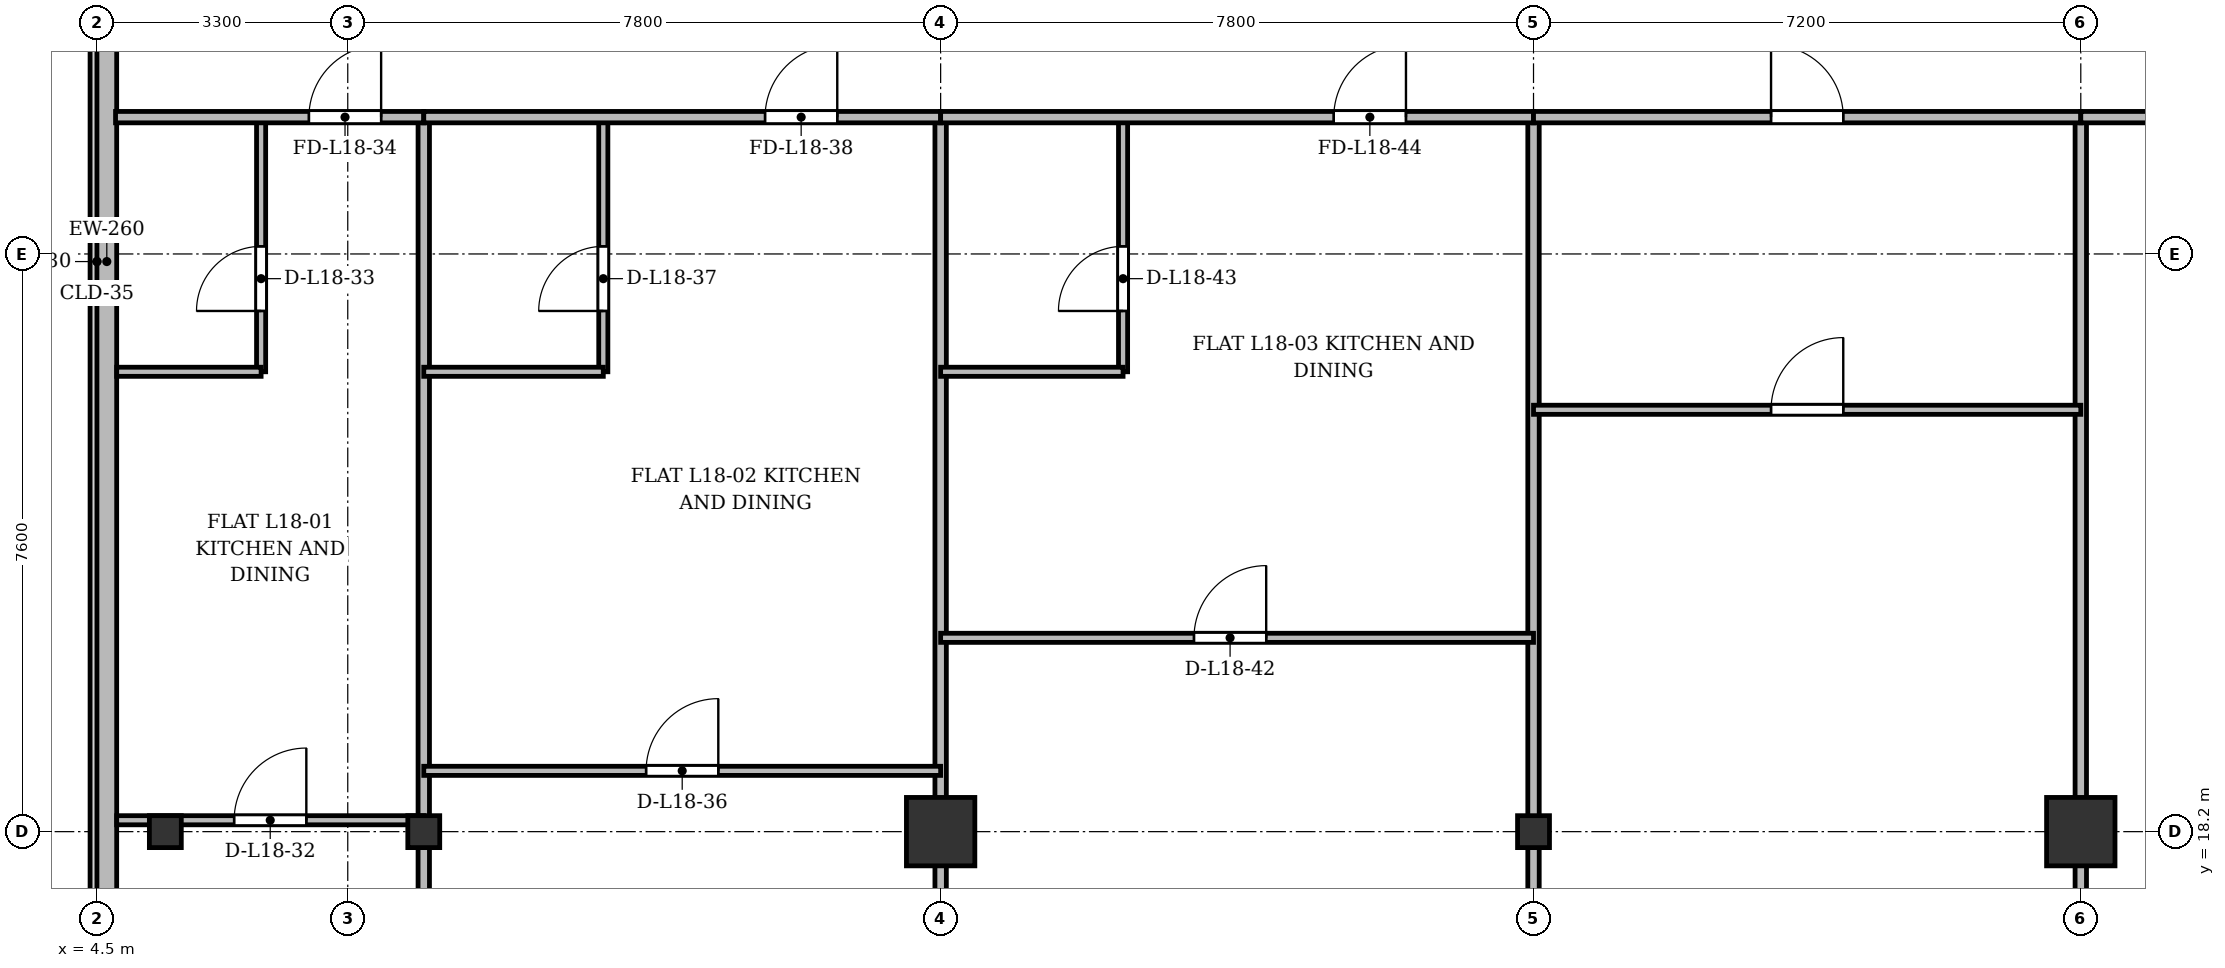
"""IFC4 building model, lengths in metres.
Left out: names, types, materials, properties, quantities, classifications, styles, units other than length and angle.
Written with IfcOpenShell. Run it as: python <this file> out.ifc"""

import sys

from ifc_helpers import new_model, si_unit, direction, frame, frame_2d, origin, origin_2d, place, context, subcontext, project, spatial, rectangle, i_section, extrude, source, transform, mapped, element, fill, save


model = new_model("IFC4")
c1 = context("Model", 3, precision=1e-05, world=origin(), true_north=direction((0.0, 1.0)))
c2 = subcontext(c1, "Body", "Model", "MODEL_VIEW")
j1 = project(units=[si_unit("LENGTHUNIT", "METRE"), si_unit("PLANEANGLEUNIT", "RADIAN")], contexts=[c1])
p1 = place(None, origin())
s1 = spatial("IfcSite", under=j1, at=p1, CompositionType="ELEMENT")
p2 = place(p1, origin())
s2 = spatial("IfcBuilding", under=s1, at=p2, CompositionType="ELEMENT")
p3 = place(p2, frame((0.0, 0.0, 70.3)))
s3 = spatial("IfcBuildingStorey", under=s2, at=p3, CompositionType="ELEMENT", Elevation=70.3)
m1 = source(origin(), c2, "Body", "SweptSolid", [
    extrude(i_section(OverallWidth=0.42, OverallDepth=0.42, WebThickness=0.026, FlangeThickness=0.04, at=origin_2d()), origin(), (0.0, 0.0, 1.0), 3.6),
])
for number, where, z_axis, x_axis in (
    (1, (5.4, 18.2, 0.0), (0.0, 0.0, 1.0), (1.0, 0.0, 0.0)),
    (2, (8.8, 18.2, 0.0), (0.0, 0.0, 1.0), (1.0, 0.0, 0.0)),
):
    element("IfcColumn", number, at=place(p3, frame(where, z_axis=z_axis, x_axis=x_axis)), inside=s3, PredefinedType="COLUMN", context=c2, shape_type="MappedRepresentation", body=[
        mapped(m1, transform((0.0, 0.0, 0.0), x_axis=(1.0, 0.0, 0.0), y_axis=(0.0, 1.0, 0.0), z_axis=(0.0, 0.0, 1.0), scale=1.0)),
    ])
m2 = source(origin(), c2, "Body", "SweptSolid", [
    extrude(rectangle(XDim=0.9, YDim=0.9, at=origin_2d()), origin(), (0.0, 0.0, 1.0), 3.6),
])
p4 = place(p3, frame((15.6, 18.2, 0.0), z_axis=(0.0, 0.0, 1.0), x_axis=(1.0, 0.0, 0.0)))
e3 = element("IfcColumn", 3, at=p4, inside=s3, PredefinedType="COLUMN", context=c2, shape_type="MappedRepresentation", body=[
    mapped(m2, transform((0.0, 0.0, 0.0), x_axis=(1.0, 0.0, 0.0), y_axis=(0.0, 1.0, 0.0), z_axis=(0.0, 0.0, 1.0), scale=1.0)),
])
p5 = place(p3, frame((23.4, 18.2, 0.0), z_axis=(0.0, 0.0, 1.0), x_axis=(1.0, 0.0, 0.0)))
e4 = element("IfcColumn", 4, at=p5, inside=s3, PredefinedType="COLUMN", context=c2, shape_type="MappedRepresentation", body=[
    mapped(m1, transform((0.0, 0.0, 0.0), x_axis=(1.0, 0.0, 0.0), y_axis=(0.0, 1.0, 0.0), z_axis=(0.0, 0.0, 1.0), scale=1.0)),
])
p6 = place(p3, frame((30.6, 18.2, 0.0), z_axis=(0.0, 0.0, 1.0), x_axis=(1.0, 0.0, 0.0)))
e5 = element("IfcColumn", 5, at=p6, inside=s3, PredefinedType="COLUMN", context=c2, shape_type="MappedRepresentation", body=[
    mapped(m2, transform((0.0, 0.0, 0.0), x_axis=(1.0, 0.0, 0.0), y_axis=(0.0, 1.0, 0.0), z_axis=(0.0, 0.0, 1.0), scale=1.0)),
])
p7 = place(p3, frame((4.63, 5.9, 0.0), z_axis=(0.0, 0.0, 1.0), x_axis=(0.0, 1.0, 0.0)))
e6 = element("IfcWall", 6, at=p7, inside=s3, PredefinedType="SOLIDWALL", context=c2, shape_type="SweptSolid", body=[
    extrude(rectangle(XDim=39.6, YDim=0.26, at=frame_2d((19.8, 0.0))), origin(), (0.0, 0.0, 1.0), 3.22),
])
p8 = place(p7, frame((1.45, 0.0, 0.92)))
e7 = element("IfcOpeningElement", 7, at=p8, cuts=e6, PredefinedType="OPENING", context=c2, shape_type="SweptSolid", body=[
    extrude(rectangle(XDim=1.2, YDim=1.65, at=frame_2d((0.6, 0.825))), frame((0.0, 0.14, 0.0), z_axis=(0.0, -1.0, 0.0), x_axis=(1.0, 0.0, 0.0)), (0.0, 0.0, 1.0), 0.28),
])
p9 = place(p7, frame((4.2, 0.0, 0.92)))
e8 = element("IfcOpeningElement", 8, at=p9, cuts=e6, PredefinedType="OPENING", context=c2, shape_type="SweptSolid", body=[
    extrude(rectangle(XDim=2.6, YDim=1.9, at=frame_2d((1.3, 0.95))), frame((0.0, 0.14, 0.0), z_axis=(0.0, -1.0, 0.0), x_axis=(1.0, 0.0, 0.0)), (0.0, 0.0, 1.0), 0.28),
])
p10 = place(p7, frame((8.4, 0.0, 0.92)))
e9 = element("IfcOpeningElement", 9, at=p10, cuts=e6, PredefinedType="OPENING", context=c2, shape_type="SweptSolid", body=[
    extrude(rectangle(XDim=2.6, YDim=1.9, at=frame_2d((1.3, 0.95))), frame((0.0, 0.14, 0.0), z_axis=(0.0, -1.0, 0.0), x_axis=(1.0, 0.0, 0.0)), (0.0, 0.0, 1.0), 0.28),
])
p11 = place(p7, frame((33.9, 0.0, 0.92)))
e10 = element("IfcOpeningElement", 10, at=p11, cuts=e6, PredefinedType="OPENING", context=c2, shape_type="SweptSolid", body=[
    extrude(rectangle(XDim=1.2, YDim=1.65, at=frame_2d((0.6, 0.825))), frame((0.0, 0.14, 0.0), z_axis=(0.0, -1.0, 0.0), x_axis=(1.0, 0.0, 0.0)), (0.0, 0.0, 1.0), 0.28),
])
p12 = place(p7, frame((37.25, 0.0, 0.92)))
e11 = element("IfcOpeningElement", 11, at=p12, cuts=e6, PredefinedType="OPENING", context=c2, shape_type="SweptSolid", body=[
    extrude(rectangle(XDim=1.2, YDim=1.65, at=frame_2d((0.6, 0.825))), frame((0.0, 0.14, 0.0), z_axis=(0.0, -1.0, 0.0), x_axis=(1.0, 0.0, 0.0)), (0.0, 0.0, 1.0), 0.28),
])
for number, where, z_axis, x_axis in (
    (12, (8.8, 3.145, 0.0), (0.0, 0.0, 1.0), (0.0, 1.0, 0.0)),
    (13, (15.6, 3.145, 0.0), (0.0, 0.0, 1.0), (0.0, 1.0, 0.0)),
):
    element("IfcWall", number, at=place(p3, frame(where, z_axis=z_axis, x_axis=x_axis)), inside=s3, PredefinedType="PARTITIONING", context=c2, shape_type="SweptSolid", body=[
        extrude(rectangle(XDim=24.455, YDim=0.15, at=frame_2d((12.228, 0.0))), origin(), (0.0, 0.0, 1.0), 2.632),
    ])
p13 = place(p3, frame((23.4, 6.41, 0.0), z_axis=(0.0, 0.0, 1.0), x_axis=(0.0, 1.0, 0.0)))
e14 = element("IfcWall", 14, at=p13, inside=s3, PredefinedType="PARTITIONING", context=c2, shape_type="SweptSolid", body=[
    extrude(rectangle(XDim=21.19, YDim=0.15, at=frame_2d((10.595, 0.0))), origin(), (0.0, 0.0, 1.0), 2.632),
])
p14 = place(p3, frame((30.6, 3.145, 0.0), z_axis=(0.0, 0.0, 1.0), x_axis=(0.0, 1.0, 0.0)))
e15 = element("IfcWall", 15, at=p14, inside=s3, PredefinedType="PARTITIONING", context=c2, shape_type="SweptSolid", body=[
    extrude(rectangle(XDim=24.455, YDim=0.15, at=frame_2d((12.228, 0.0))), origin(), (0.0, 0.0, 1.0), 2.632),
])
p15 = place(p3, frame((4.76, 18.35, 0.0), z_axis=(0.0, 0.0, 1.0), x_axis=(1.0, 0.0, 0.0)))
e16 = element("IfcWall", 16, at=p15, inside=s3, PredefinedType="PARTITIONING", context=c2, shape_type="SweptSolid", body=[
    extrude(rectangle(XDim=4.04, YDim=0.12, at=frame_2d((2.02, 0.0))), origin(), (0.0, 0.0, 1.0), 2.57),
])
p16 = place(p15, frame((1.545, 0.0, 0.0)))
e17 = element("IfcOpeningElement", 17, at=p16, cuts=e16, PredefinedType="OPENING", context=c2, shape_type="SweptSolid", body=[
    extrude(rectangle(XDim=0.95, YDim=2.15, at=frame_2d((0.475, 1.075))), frame((0.0, 0.07, 0.0), z_axis=(0.0, -1.0, 0.0), x_axis=(1.0, 0.0, 0.0)), (0.0, 0.0, 1.0), 0.14),
])
p17 = place(p3, frame((6.66, 24.25, 0.0), z_axis=(0.0, 0.0, 1.0), x_axis=(0.0, 1.0, 0.0)))
e18 = element("IfcWall", 18, at=p17, inside=s3, PredefinedType="PARTITIONING", context=c2, shape_type="SweptSolid", body=[
    extrude(rectangle(XDim=3.35, YDim=0.12, at=frame_2d((1.675, 0.0))), origin(), (0.0, 0.0, 1.0), 2.82),
])
p18 = place(p17, frame((0.8, 0.0, 0.0)))
e19 = element("IfcOpeningElement", 19, at=p18, cuts=e18, PredefinedType="OPENING", context=c2, shape_type="SweptSolid", body=[
    extrude(rectangle(XDim=0.85, YDim=2.1, at=frame_2d((0.425, 1.05))), frame((0.0, 0.07, 0.0), z_axis=(0.0, -1.0, 0.0), x_axis=(1.0, 0.0, 0.0)), (0.0, 0.0, 1.0), 0.14),
])
p19 = place(p3, frame((4.76, 24.25, 0.0), z_axis=(0.0, 0.0, 1.0), x_axis=(1.0, 0.0, 0.0)))
e20 = element("IfcWall", 20, at=p19, inside=s3, PredefinedType="PARTITIONING", context=c2, shape_type="SweptSolid", body=[
    extrude(rectangle(XDim=1.9, YDim=0.12, at=frame_2d((0.95, 0.0))), origin(), (0.0, 0.0, 1.0), 2.632),
])
p20 = place(p3, frame((4.745, 27.6, 0.0), z_axis=(0.0, 0.0, 1.0), x_axis=(1.0, 0.0, 0.0)))
e21 = element("IfcWall", 21, at=p20, inside=s3, PredefinedType="PARTITIONING", context=c2, shape_type="SweptSolid", body=[
    extrude(rectangle(XDim=4.055, YDim=0.15, at=frame_2d((2.027, 0.0))), origin(), (0.0, 0.0, 1.0), 2.632),
])
p21 = place(p20, frame((2.544, 0.0, 0.0)))
e22 = element("IfcOpeningElement", 22, at=p21, cuts=e21, PredefinedType="OPENING", context=c2, shape_type="SweptSolid", body=[
    extrude(rectangle(XDim=0.95, YDim=2.15, at=frame_2d((0.475, 1.075))), frame((0.0, 0.085, 0.0), z_axis=(0.0, -1.0, 0.0), x_axis=(1.0, 0.0, 0.0)), (0.0, 0.0, 1.0), 0.17),
])
p22 = place(p3, frame((8.8, 19.0, 0.0), z_axis=(0.0, 0.0, 1.0), x_axis=(1.0, 0.0, 0.0)))
e23 = element("IfcWall", 23, at=p22, inside=s3, PredefinedType="PARTITIONING", context=c2, shape_type="SweptSolid", body=[
    extrude(rectangle(XDim=6.8, YDim=0.12, at=frame_2d((3.4, 0.0))), origin(), (0.0, 0.0, 1.0), 2.632),
])
p23 = place(p22, frame((2.925, 0.0, 0.0)))
e24 = element("IfcOpeningElement", 24, at=p23, cuts=e23, PredefinedType="OPENING", context=c2, shape_type="SweptSolid", body=[
    extrude(rectangle(XDim=0.95, YDim=2.15, at=frame_2d((0.475, 1.075))), frame((0.0, 0.07, 0.0), z_axis=(0.0, -1.0, 0.0), x_axis=(1.0, 0.0, 0.0)), (0.0, 0.0, 1.0), 0.14),
])
p24 = place(p3, frame((11.162, 24.25, 0.0), z_axis=(0.0, 0.0, 1.0), x_axis=(0.0, 1.0, 0.0)))
e25 = element("IfcWall", 25, at=p24, inside=s3, PredefinedType="PARTITIONING", context=c2, shape_type="SweptSolid", body=[
    extrude(rectangle(XDim=3.35, YDim=0.12, at=frame_2d((1.675, 0.0))), origin(), (0.0, 0.0, 1.0), 2.82),
])
p25 = place(p24, frame((0.8, 0.0, 0.0)))
e26 = element("IfcOpeningElement", 26, at=p25, cuts=e25, PredefinedType="OPENING", context=c2, shape_type="SweptSolid", body=[
    extrude(rectangle(XDim=0.85, YDim=2.1, at=frame_2d((0.425, 1.05))), frame((0.0, 0.07, 0.0), z_axis=(0.0, -1.0, 0.0), x_axis=(1.0, 0.0, 0.0)), (0.0, 0.0, 1.0), 0.14),
])
p26 = place(p3, frame((8.8, 24.25, 0.0), z_axis=(0.0, 0.0, 1.0), x_axis=(1.0, 0.0, 0.0)))
e27 = element("IfcWall", 27, at=p26, inside=s3, PredefinedType="PARTITIONING", context=c2, shape_type="SweptSolid", body=[
    extrude(rectangle(XDim=2.362, YDim=0.12, at=frame_2d((1.181, 0.0))), origin(), (0.0, 0.0, 1.0), 2.632),
])
p27 = place(p3, frame((8.8, 27.6, 0.0), z_axis=(0.0, 0.0, 1.0), x_axis=(1.0, 0.0, 0.0)))
e28 = element("IfcWall", 28, at=p27, inside=s3, PredefinedType="PARTITIONING", context=c2, shape_type="SweptSolid", body=[
    extrude(rectangle(XDim=6.8, YDim=0.15, at=frame_2d((3.4, 0.0))), origin(), (0.0, 0.0, 1.0), 2.632),
])
p28 = place(p27, frame((4.49, 0.0, 0.0)))
e29 = element("IfcOpeningElement", 29, at=p28, cuts=e28, PredefinedType="OPENING", context=c2, shape_type="SweptSolid", body=[
    extrude(rectangle(XDim=0.95, YDim=2.15, at=frame_2d((0.475, 1.075))), frame((0.0, 0.085, 0.0), z_axis=(0.0, -1.0, 0.0), x_axis=(1.0, 0.0, 0.0)), (0.0, 0.0, 1.0), 0.17),
])
p29 = place(p3, frame((15.6, 20.75, 0.0), z_axis=(0.0, 0.0, 1.0), x_axis=(1.0, 0.0, 0.0)))
e30 = element("IfcWall", 30, at=p29, inside=s3, PredefinedType="PARTITIONING", context=c2, shape_type="SweptSolid", body=[
    extrude(rectangle(XDim=7.8, YDim=0.12, at=frame_2d((3.9, 0.0))), origin(), (0.0, 0.0, 1.0), 2.632),
])
p30 = place(p29, frame((3.333, 0.0, 0.0)))
e31 = element("IfcOpeningElement", 31, at=p30, cuts=e30, PredefinedType="OPENING", context=c2, shape_type="SweptSolid", body=[
    extrude(rectangle(XDim=0.95, YDim=2.15, at=frame_2d((0.475, 1.075))), frame((0.0, 0.07, 0.0), z_axis=(0.0, -1.0, 0.0), x_axis=(1.0, 0.0, 0.0)), (0.0, 0.0, 1.0), 0.14),
])
p31 = place(p3, frame((18.0, 24.25, 0.0), z_axis=(0.0, 0.0, 1.0), x_axis=(0.0, 1.0, 0.0)))
e32 = element("IfcWall", 32, at=p31, inside=s3, PredefinedType="PARTITIONING", context=c2, shape_type="SweptSolid", body=[
    extrude(rectangle(XDim=3.35, YDim=0.12, at=frame_2d((1.675, 0.0))), origin(), (0.0, 0.0, 1.0), 2.82),
])
p32 = place(p31, frame((0.8, 0.0, 0.0)))
e33 = element("IfcOpeningElement", 33, at=p32, cuts=e32, PredefinedType="OPENING", context=c2, shape_type="SweptSolid", body=[
    extrude(rectangle(XDim=0.85, YDim=2.1, at=frame_2d((0.425, 1.05))), frame((0.0, 0.07, 0.0), z_axis=(0.0, -1.0, 0.0), x_axis=(1.0, 0.0, 0.0)), (0.0, 0.0, 1.0), 0.14),
])
p33 = place(p3, frame((15.6, 24.25, 0.0), z_axis=(0.0, 0.0, 1.0), x_axis=(1.0, 0.0, 0.0)))
e34 = element("IfcWall", 34, at=p33, inside=s3, PredefinedType="PARTITIONING", context=c2, shape_type="SweptSolid", body=[
    extrude(rectangle(XDim=2.4, YDim=0.12, at=frame_2d((1.2, 0.0))), origin(), (0.0, 0.0, 1.0), 2.632),
])
p34 = place(p3, frame((15.6, 27.6, 0.0), z_axis=(0.0, 0.0, 1.0), x_axis=(1.0, 0.0, 0.0)))
e35 = element("IfcWall", 35, at=p34, inside=s3, PredefinedType="PARTITIONING", context=c2, shape_type="SweptSolid", body=[
    extrude(rectangle(XDim=7.8, YDim=0.15, at=frame_2d((3.9, 0.0))), origin(), (0.0, 0.0, 1.0), 2.632),
])
p35 = place(p34, frame((5.172, 0.0, 0.0)))
e36 = element("IfcOpeningElement", 36, at=p35, cuts=e35, PredefinedType="OPENING", context=c2, shape_type="SweptSolid", body=[
    extrude(rectangle(XDim=0.95, YDim=2.15, at=frame_2d((0.475, 1.075))), frame((0.0, 0.085, 0.0), z_axis=(0.0, -1.0, 0.0), x_axis=(1.0, 0.0, 0.0)), (0.0, 0.0, 1.0), 0.17),
])
p36 = place(p3, frame((23.4, 27.6, 0.0), z_axis=(0.0, 0.0, 1.0), x_axis=(1.0, 0.0, 0.0)))
e37 = element("IfcWall", 37, at=p36, inside=s3, PredefinedType="PARTITIONING", context=c2, shape_type="SweptSolid", body=[
    extrude(rectangle(XDim=7.2, YDim=0.15, at=frame_2d((3.6, 0.0))), origin(), (0.0, 0.0, 1.0), 2.632),
])
p37 = place(p36, frame((3.125, 0.0, 0.0)))
e38 = element("IfcOpeningElement", 38, at=p37, cuts=e37, PredefinedType="OPENING", context=c2, shape_type="SweptSolid", body=[
    extrude(rectangle(XDim=0.95, YDim=2.15, at=frame_2d((0.475, 1.075))), frame((0.0, 0.085, 0.0), z_axis=(0.0, -1.0, 0.0), x_axis=(1.0, 0.0, 0.0)), (0.0, 0.0, 1.0), 0.17),
])
p38 = place(p3, frame((23.4, 23.75, 0.0), z_axis=(0.0, 0.0, 1.0), x_axis=(1.0, 0.0, 0.0)))
e39 = element("IfcWall", 39, at=p38, inside=s3, PredefinedType="PARTITIONING", context=c2, shape_type="SweptSolid", body=[
    extrude(rectangle(XDim=7.2, YDim=0.12, at=frame_2d((3.6, 0.0))), origin(), (0.0, 0.0, 1.0), 2.632),
])
p39 = place(p38, frame((3.125, 0.0, 0.0)))
e40 = element("IfcOpeningElement", 40, at=p39, cuts=e39, PredefinedType="OPENING", context=c2, shape_type="SweptSolid", body=[
    extrude(rectangle(XDim=0.95, YDim=2.15, at=frame_2d((0.475, 1.075))), frame((0.0, 0.07, 0.0), z_axis=(0.0, -1.0, 0.0), x_axis=(1.0, 0.0, 0.0)), (0.0, 0.0, 1.0), 0.14),
])
p40 = place(p3, frame((30.6, 27.6, 0.0), z_axis=(0.0, 0.0, 1.0), x_axis=(1.0, 0.0, 0.0)))
e41 = element("IfcWall", 41, at=p40, inside=s3, PredefinedType="PARTITIONING", context=c2, shape_type="SweptSolid", body=[
    extrude(rectangle(XDim=13.2, YDim=0.15, at=frame_2d((6.6, 0.0))), origin(), (0.0, 0.0, 1.0), 2.632),
])
p41 = place(p40, frame((5.8, 0.0, 0.0)))
e42 = element("IfcOpeningElement", 42, at=p41, cuts=e41, PredefinedType="OPENING", context=c2, shape_type="SweptSolid", body=[
    extrude(rectangle(XDim=1.6, YDim=2.2, at=frame_2d((0.8, 1.1))), frame((0.0, 0.085, 0.0), z_axis=(0.0, -1.0, 0.0), x_axis=(1.0, 0.0, 0.0)), (0.0, 0.0, 1.0), 0.17),
])
m3 = source(origin(), c2, "Body", "SweptSolid", [
    extrude(rectangle(XDim=0.95, YDim=2.15, at=frame_2d((0.475, 1.075))), frame((0.0, 0.025, 0.0), z_axis=(0.0, -1.0, 0.0), x_axis=(1.0, 0.0, 0.0)), (0.0, 0.0, 1.0), 0.05),
])
p42 = place(p16, origin())
e43 = element("IfcDoor", 43, at=p42, inside=s3, OperationType="SINGLE_SWING_RIGHT", PredefinedType="DOOR", context=c2, shape_type="MappedRepresentation", body=[
    mapped(m3, transform((0.0, 0.0, 0.0), x_axis=(1.0, 0.0, 0.0), y_axis=(0.0, 1.0, 0.0), z_axis=(0.0, 0.0, 1.0), scale=1.0)),
])
fill(e17, e43)
m4 = source(origin(), c2, "Body", "SweptSolid", [
    extrude(rectangle(XDim=0.85, YDim=2.1, at=frame_2d((0.425, 1.05))), frame((0.0, 0.025, 0.0), z_axis=(0.0, -1.0, 0.0), x_axis=(1.0, 0.0, 0.0)), (0.0, 0.0, 1.0), 0.05),
])
p43 = place(p18, origin())
e44 = element("IfcDoor", 44, at=p43, inside=s3, OperationType="SINGLE_SWING_LEFT", PredefinedType="DOOR", context=c2, shape_type="MappedRepresentation", body=[
    mapped(m4, transform((0.0, 0.0, 0.0), x_axis=(1.0, 0.0, 0.0), y_axis=(0.0, 1.0, 0.0), z_axis=(0.0, 0.0, 1.0), scale=1.0)),
])
fill(e19, e44)
p44 = place(p21, origin())
e45 = element("IfcDoor", 45, at=p44, inside=s3, OperationType="SINGLE_SWING_RIGHT", PredefinedType="DOOR", context=c2, shape_type="MappedRepresentation", body=[
    mapped(m3, transform((0.0, 0.0, 0.0), x_axis=(1.0, 0.0, 0.0), y_axis=(0.0, 1.0, 0.0), z_axis=(0.0, 0.0, 1.0), scale=1.0)),
])
fill(e22, e45)
p45 = place(p23, origin())
e46 = element("IfcDoor", 46, at=p45, inside=s3, OperationType="SINGLE_SWING_RIGHT", PredefinedType="DOOR", context=c2, shape_type="MappedRepresentation", body=[
    mapped(m3, transform((0.0, 0.0, 0.0), x_axis=(1.0, 0.0, 0.0), y_axis=(0.0, 1.0, 0.0), z_axis=(0.0, 0.0, 1.0), scale=1.0)),
])
fill(e24, e46)
p46 = place(p25, origin())
e47 = element("IfcDoor", 47, at=p46, inside=s3, OperationType="SINGLE_SWING_LEFT", PredefinedType="DOOR", context=c2, shape_type="MappedRepresentation", body=[
    mapped(m4, transform((0.0, 0.0, 0.0), x_axis=(1.0, 0.0, 0.0), y_axis=(0.0, 1.0, 0.0), z_axis=(0.0, 0.0, 1.0), scale=1.0)),
])
fill(e26, e47)
p47 = place(p28, origin())
e48 = element("IfcDoor", 48, at=p47, inside=s3, OperationType="SINGLE_SWING_RIGHT", PredefinedType="DOOR", context=c2, shape_type="MappedRepresentation", body=[
    mapped(m3, transform((0.0, 0.0, 0.0), x_axis=(1.0, 0.0, 0.0), y_axis=(0.0, 1.0, 0.0), z_axis=(0.0, 0.0, 1.0), scale=1.0)),
])
fill(e29, e48)
p48 = place(p30, origin())
e49 = element("IfcDoor", 49, at=p48, inside=s3, OperationType="SINGLE_SWING_RIGHT", PredefinedType="DOOR", context=c2, shape_type="MappedRepresentation", body=[
    mapped(m3, transform((0.0, 0.0, 0.0), x_axis=(1.0, 0.0, 0.0), y_axis=(0.0, 1.0, 0.0), z_axis=(0.0, 0.0, 1.0), scale=1.0)),
])
fill(e31, e49)
p49 = place(p32, origin())
e50 = element("IfcDoor", 50, at=p49, inside=s3, OperationType="SINGLE_SWING_LEFT", PredefinedType="DOOR", context=c2, shape_type="MappedRepresentation", body=[
    mapped(m4, transform((0.0, 0.0, 0.0), x_axis=(1.0, 0.0, 0.0), y_axis=(0.0, 1.0, 0.0), z_axis=(0.0, 0.0, 1.0), scale=1.0)),
])
fill(e33, e50)
p50 = place(p35, origin())
e51 = element("IfcDoor", 51, at=p50, inside=s3, OperationType="SINGLE_SWING_RIGHT", PredefinedType="DOOR", context=c2, shape_type="MappedRepresentation", body=[
    mapped(m3, transform((0.0, 0.0, 0.0), x_axis=(1.0, 0.0, 0.0), y_axis=(0.0, 1.0, 0.0), z_axis=(0.0, 0.0, 1.0), scale=1.0)),
])
fill(e36, e51)
p51 = place(p37, origin())
e52 = element("IfcDoor", 52, at=p51, inside=s3, OperationType="SINGLE_SWING_LEFT", PredefinedType="DOOR", context=c2, shape_type="MappedRepresentation", body=[
    mapped(m3, transform((0.0, 0.0, 0.0), x_axis=(1.0, 0.0, 0.0), y_axis=(0.0, 1.0, 0.0), z_axis=(0.0, 0.0, 1.0), scale=1.0)),
])
fill(e38, e52)
p52 = place(p39, origin())
e53 = element("IfcDoor", 53, at=p52, inside=s3, OperationType="SINGLE_SWING_RIGHT", PredefinedType="DOOR", context=c2, shape_type="MappedRepresentation", body=[
    mapped(m3, transform((0.0, 0.0, 0.0), x_axis=(1.0, 0.0, 0.0), y_axis=(0.0, 1.0, 0.0), z_axis=(0.0, 0.0, 1.0), scale=1.0)),
])
fill(e40, e53)
save(model, sys.argv[1])
